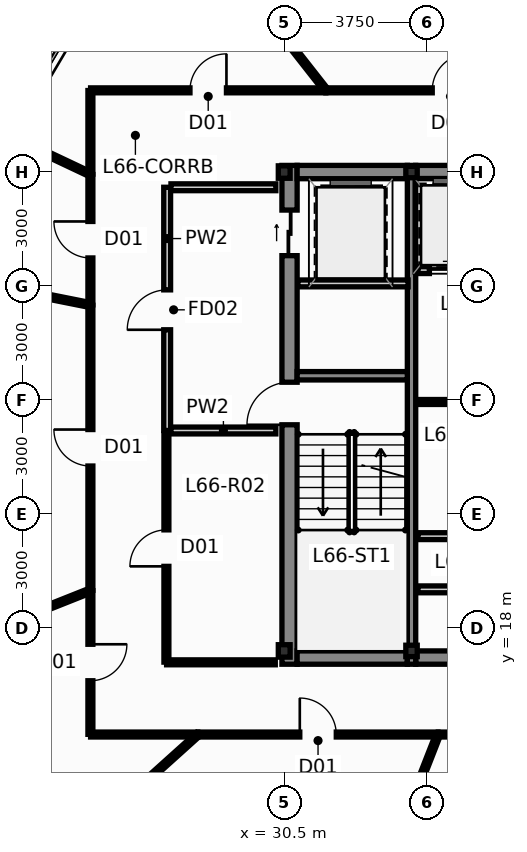
"""IFC4 building model, lengths in metres.
Left out: names, types, materials, properties, quantities, classifications, styles, units other than length and angle.
Written with IfcOpenShell. Run it as: python <this file> out.ifc"""

import sys

from ifc_helpers import new_model, si_unit, direction, frame, frame_2d, origin, origin_2d, place, context, subcontext, project, spatial, rectangle, hollow_rectangle, i_section, extrude, source, transform, mapped, element, fill, save


model = new_model("IFC4")
c1 = context("Model", 3, precision=1e-05, world=origin(), true_north=direction((0.0, 1.0)))
c2 = subcontext(c1, "Body", "Model", "MODEL_VIEW")
j1 = project(units=[si_unit("LENGTHUNIT", "METRE"), si_unit("PLANEANGLEUNIT", "RADIAN")], contexts=[c1])
p1 = place(None, origin())
s1 = spatial("IfcSite", under=j1, at=p1, CompositionType="ELEMENT")
p2 = place(p1, origin())
s2 = spatial("IfcBuilding", under=s1, at=p2, CompositionType="ELEMENT")
p3 = place(p2, frame((0.0, 0.0, 251.75)))
s3 = spatial("IfcBuildingStorey", under=s2, at=p3, CompositionType="ELEMENT", Elevation=251.75)
m1 = source(origin(), c2, "Body", "SweptSolid", [
    extrude(i_section(OverallWidth=0.311, OverallDepth=0.327, WebThickness=0.016, FlangeThickness=0.025, at=origin_2d()), origin(), (0.0, 0.0, 1.0), 3.65),
])
for number, where, z_axis, x_axis in (
    (1, (30.5, 17.4, 0.0), (0.0, 0.0, 1.0), (1.0, 0.0, 0.0)),
    (2, (30.5, 30.0, 0.0), (0.0, 0.0, 1.0), (1.0, 0.0, 0.0)),
):
    element("IfcColumn", number, at=place(p3, frame(where, z_axis=z_axis, x_axis=x_axis)), inside=s3, PredefinedType="COLUMN", context=c2, shape_type="MappedRepresentation", body=[
        mapped(m1, transform((0.0, 0.0, 0.0), scale=1.0)),
    ])
m2 = source(origin(), c2, "Body", "SweptSolid", [
    extrude(hollow_rectangle(XDim=0.3, YDim=0.3, WallThickness=0.012, at=origin_2d()), origin(), (0.0, 0.0, 1.0), 3.65),
])
for number, where, z_axis, x_axis in (
    (3, (33.85, 17.4, 0.0), (0.0, 0.0, 1.0), (1.0, 0.0, 0.0)),
    (4, (33.85, 30.0, 0.0), (0.0, 0.0, 1.0), (1.0, 0.0, 0.0)),
):
    element("IfcColumn", number, at=place(p3, frame(where, z_axis=z_axis, x_axis=x_axis)), inside=s3, PredefinedType="COLUMN", context=c2, shape_type="MappedRepresentation", body=[
        mapped(m2, transform((0.0, 0.0, 0.0), scale=1.0)),
    ])
p4 = place(p3, frame((30.64, 17.05, 0.0), z_axis=(0.0, 0.0, 1.0), x_axis=(0.0, 1.0, 0.0)))
e5 = element("IfcWall", 5, at=p4, inside=s3, PredefinedType="SHEAR", context=c2, shape_type="SweptSolid", body=[
    extrude(rectangle(XDim=13.125, YDim=0.4, at=frame_2d((6.562, 0.0))), origin(), (0.0, 0.0, 1.0), 3.65),
])
p5 = place(p4, frame((6.3, 0.0, 0.0)))
e6 = element("IfcOpeningElement", 6, at=p5, cuts=e5, PredefinedType="OPENING", context=c2, shape_type="SweptSolid", body=[
    extrude(rectangle(XDim=1.12, YDim=2.15, at=frame_2d((0.56, 1.075))), frame((0.0, 0.212, 0.0), z_axis=(0.0, -1.0, 0.0), x_axis=(1.0, 0.0, 0.0)), (0.0, 0.0, 1.0), 0.424),
])
p6 = place(p4, frame((10.75, 0.0, 0.0)))
e7 = element("IfcOpeningElement", 7, at=p6, cuts=e5, PredefinedType="OPENING", context=c2, shape_type="SweptSolid", body=[
    extrude(rectangle(XDim=1.2, YDim=2.2, at=frame_2d((0.6, 1.1))), frame((0.0, 0.212, 0.0), z_axis=(0.0, -1.0, 0.0), x_axis=(1.0, 0.0, 0.0)), (0.0, 0.0, 1.0), 0.424),
])
p7 = place(p3, frame((30.84, 17.225, 0.0), z_axis=(0.0, 0.0, 1.0), x_axis=(1.0, 0.0, 0.0)))
e8 = element("IfcWall", 8, at=p7, inside=s3, PredefinedType="SHEAR", context=c2, shape_type="SweptSolid", body=[
    extrude(rectangle(XDim=2.9, YDim=0.35, at=frame_2d((1.45, 0.0))), origin(), (0.0, 0.0, 1.0), 3.65),
])
p8 = place(p3, frame((33.96, 17.225, 0.0), z_axis=(0.0, 0.0, 1.0), x_axis=(1.0, 0.0, 0.0)))
e9 = element("IfcWall", 9, at=p8, inside=s3, PredefinedType="SHEAR", context=c2, shape_type="SweptSolid", body=[
    extrude(rectangle(XDim=8.08, YDim=0.35, at=frame_2d((4.04, 0.0))), origin(), (0.0, 0.0, 1.0), 3.65),
])
p9 = place(p3, frame((30.84, 30.0, 0.0), z_axis=(0.0, 0.0, 1.0), x_axis=(1.0, 0.0, 0.0)))
e10 = element("IfcWall", 10, at=p9, inside=s3, PredefinedType="SHEAR", context=c2, shape_type="SweptSolid", body=[
    extrude(rectangle(XDim=2.9, YDim=0.35, at=frame_2d((1.45, 0.0))), origin(), (0.0, 0.0, 1.0), 3.65),
])
p10 = place(p3, frame((33.96, 30.0, 0.0), z_axis=(0.0, 0.0, 1.0), x_axis=(1.0, 0.0, 0.0)))
e11 = element("IfcWall", 11, at=p10, inside=s3, PredefinedType="SHEAR", context=c2, shape_type="SweptSolid", body=[
    extrude(rectangle(XDim=3.78, YDim=0.35, at=frame_2d((1.89, 0.0))), origin(), (0.0, 0.0, 1.0), 3.65),
])
p11 = place(p3, frame((33.85, 17.05, 0.0), z_axis=(0.0, 0.0, 1.0), x_axis=(0.0, 1.0, 0.0)))
e12 = element("IfcWall", 12, at=p11, inside=s3, PredefinedType="SHEAR", context=c2, shape_type="SweptSolid", body=[
    extrude(rectangle(XDim=13.125, YDim=0.22, at=frame_2d((6.562, 0.0))), origin(), (0.0, 0.0, 1.0), 3.65),
])
p12 = place(p3, frame((30.84, 24.64, 0.0), z_axis=(0.0, 0.0, 1.0), x_axis=(1.0, 0.0, 0.0)))
e13 = element("IfcWall", 13, at=p12, inside=s3, PredefinedType="SHEAR", context=c2, shape_type="SweptSolid", body=[
    extrude(rectangle(XDim=2.9, YDim=0.22, at=frame_2d((1.45, 0.0))), origin(), (0.0, 0.0, 1.0), 3.65),
])
p13 = place(p3, frame((34.02, 27.42, 0.0), z_axis=(0.0, 0.0, 1.0), x_axis=(1.0, 0.0, 0.0)))
e14 = element("IfcWall", 14, at=p13, inside=s3, PredefinedType="PARTITIONING", context=c2, shape_type="SweptSolid", body=[
    extrude(rectangle(XDim=3.66, YDim=0.18, at=frame_2d((1.83, 0.0))), origin(), (0.0, 0.0, 1.0), 3.4),
])
p14 = place(p13, frame((0.3, 0.0, 0.0)))
e15 = element("IfcOpeningElement", 15, at=p14, cuts=e14, PredefinedType="OPENING", context=c2, shape_type="SweptSolid", body=[
    extrude(rectangle(XDim=1.15, YDim=2.2, at=frame_2d((0.575, 1.1))), frame((0.0, 0.102, 0.0), z_axis=(0.0, -1.0, 0.0), x_axis=(1.0, 0.0, 0.0)), (0.0, 0.0, 1.0), 0.204),
])
p15 = place(p13, frame((2.1, 0.0, 0.0)))
e16 = element("IfcOpeningElement", 16, at=p15, cuts=e14, PredefinedType="OPENING", context=c2, shape_type="SweptSolid", body=[
    extrude(rectangle(XDim=1.15, YDim=2.2, at=frame_2d((0.575, 1.1))), frame((0.0, 0.102, 0.0), z_axis=(0.0, -1.0, 0.0), x_axis=(1.0, 0.0, 0.0)), (0.0, 0.0, 1.0), 0.204),
])
p16 = place(p3, frame((27.42, 23.2, 0.0), z_axis=(0.0, 0.0, 1.0), x_axis=(0.0, 1.0, 0.0)))
e17 = element("IfcWall", 17, at=p16, inside=s3, PredefinedType="PARTITIONING", context=c2, shape_type="SweptSolid", body=[
    extrude(rectangle(XDim=6.4, YDim=0.18, at=frame_2d((3.2, 0.0))), origin(), (0.0, 0.0, 1.0), 3.129),
])
p17 = place(p16, frame((2.65, 0.0, 0.0)))
e18 = element("IfcOpeningElement", 18, at=p17, cuts=e17, PredefinedType="OPENING", context=c2, shape_type="SweptSolid", body=[
    extrude(rectangle(XDim=1.05, YDim=2.15, at=frame_2d((0.525, 1.075))), frame((0.0, 0.102, 0.0), z_axis=(0.0, -1.0, 0.0), x_axis=(1.0, 0.0, 0.0)), (0.0, 0.0, 1.0), 0.204),
])
for number, where, z_axis, x_axis in (
    (19, (27.52, 23.2, 0.0), (0.0, 0.0, 1.0), (1.0, 0.0, 0.0)),
    (20, (27.52, 29.6, 0.0), (0.0, 0.0, 1.0), (1.0, 0.0, 0.0)),
):
    element("IfcWall", number, at=place(p3, frame(where, z_axis=z_axis, x_axis=x_axis)), inside=s3, PredefinedType="PARTITIONING", context=c2, shape_type="SweptSolid", body=[
        extrude(rectangle(XDim=2.76, YDim=0.18, at=frame_2d((1.38, 0.0))), origin(), (0.0, 0.0, 1.0), 3.4),
    ])
p18 = place(p3, frame((30.86, 27.07, 0.0), z_axis=(0.0, 0.0, 1.0), x_axis=(1.0, 0.0, 0.0)))
e21 = element("IfcWall", 21, at=p18, inside=s3, PredefinedType="PARTITIONING", context=c2, shape_type="SweptSolid", body=[
    extrude(rectangle(XDim=2.9, YDim=0.18, at=frame_2d((1.45, 0.0))), origin(), (0.0, 0.0, 1.0), 3.4),
])
p19 = place(p3, frame((34.02, 20.42, 0.0), z_axis=(0.0, 0.0, 1.0), x_axis=(1.0, 0.0, 0.0)))
e22 = element("IfcWall", 22, at=p19, inside=s3, PredefinedType="PARTITIONING", context=c2, shape_type="SweptSolid", body=[
    extrude(rectangle(XDim=3.64, YDim=0.18, at=frame_2d((1.82, 0.0))), origin(), (0.0, 0.0, 1.0), 3.4),
])
p20 = place(p3, frame((34.02, 23.95, 0.0), z_axis=(0.0, 0.0, 1.0), x_axis=(1.0, 0.0, 0.0)))
e23 = element("IfcWall", 23, at=p20, inside=s3, PredefinedType="PARTITIONING", context=c2, shape_type="SweptSolid", body=[
    extrude(rectangle(XDim=3.58, YDim=0.13, at=frame_2d((1.79, 0.0))), origin(), (0.0, 0.0, 1.0), 3.4),
])
p21 = place(p3, frame((34.02, 19.02, 0.0), z_axis=(0.0, 0.0, 1.0), x_axis=(1.0, 0.0, 0.0)))
e24 = element("IfcWall", 24, at=p21, inside=s3, PredefinedType="PARTITIONING", context=c2, shape_type="SweptSolid", body=[
    extrude(rectangle(XDim=3.58, YDim=0.18, at=frame_2d((1.79, 0.0))), origin(), (0.0, 0.0, 1.0), 3.4),
])
p22 = place(p3, frame((13.459, 14.239, 0.0), z_axis=(0.0, 0.0, 1.0), x_axis=(0.929165812846, 0.369663214613, 0.0)))
e25 = element("IfcWall", 25, at=p22, inside=s3, PredefinedType="PARTITIONING", context=c2, shape_type="SweptSolid", body=[
    extrude(rectangle(XDim=12.846, YDim=0.13, at=frame_2d((6.423, 0.0))), origin(), (0.0, 0.0, 1.0), 2.985),
])
p23 = place(p3, frame((25.4, 18.995, 0.0), z_axis=(0.0, 0.0, 1.0), x_axis=(0.0, 1.0, 0.0)))
e26 = element("IfcWall", 26, at=p23, inside=s3, PredefinedType="PARTITIONING", context=c2, shape_type="SweptSolid", body=[
    extrude(rectangle(XDim=7.5, YDim=0.13, at=frame_2d((3.75, 0.0))), origin(), (0.0, 0.0, 1.0), 3.129),
])
p24 = place(p23, frame((3.27, 0.0, 0.0)))
e27 = element("IfcOpeningElement", 27, at=p24, cuts=e26, PredefinedType="OPENING", context=c2, shape_type="SweptSolid", body=[
    extrude(rectangle(XDim=0.96, YDim=2.15, at=frame_2d((0.48, 1.075))), frame((0.0, 0.077, 0.0), z_axis=(0.0, -1.0, 0.0), x_axis=(1.0, 0.0, 0.0)), (0.0, 0.0, 1.0), 0.154),
])
p25 = place(p3, frame((27.281, 37.652, 0.0), z_axis=(0.0, 0.0, 1.0), x_axis=(0.617460484655, -0.786601900512, 0.0)))
e28 = element("IfcWall", 28, at=p25, inside=s3, PredefinedType="PARTITIONING", context=c2, shape_type="SweptSolid", body=[
    extrude(rectangle(XDim=6.989, YDim=0.13, at=frame_2d((3.495, 0.0))), origin(), (0.0, 0.0, 1.0), 2.985),
])
p26 = place(p3, frame((31.605, 32.15, 0.0), z_axis=(0.0, 0.0, 1.0), x_axis=(1.0, 0.0, 0.0)))
e29 = element("IfcWall", 29, at=p26, inside=s3, PredefinedType="PARTITIONING", context=c2, shape_type="SweptSolid", body=[
    extrude(rectangle(XDim=6.54, YDim=0.13, at=frame_2d((3.27, 0.0))), origin(), (0.0, 0.0, 1.0), 3.4),
])
p27 = place(p26, frame((2.79, 0.0, 0.0)))
e30 = element("IfcOpeningElement", 30, at=p27, cuts=e29, PredefinedType="OPENING", context=c2, shape_type="SweptSolid", body=[
    extrude(rectangle(XDim=0.96, YDim=2.15, at=frame_2d((0.48, 1.075))), frame((0.0, 0.077, 0.0), z_axis=(0.0, -1.0, 0.0), x_axis=(1.0, 0.0, 0.0)), (0.0, 0.0, 1.0), 0.154),
])
p28 = place(p3, frame((28.235, 15.2, 0.0), z_axis=(0.0, 0.0, 1.0), x_axis=(1.0, 0.0, 0.0)))
e31 = element("IfcWall", 31, at=p28, inside=s3, PredefinedType="PARTITIONING", context=c2, shape_type="SweptSolid", body=[
    extrude(rectangle(XDim=6.31, YDim=0.13, at=frame_2d((3.155, 0.0))), origin(), (0.0, 0.0, 1.0), 3.129),
])
p29 = place(p28, frame((2.675, 0.0, 0.0)))
e32 = element("IfcOpeningElement", 32, at=p29, cuts=e31, PredefinedType="OPENING", context=c2, shape_type="SweptSolid", body=[
    extrude(rectangle(XDim=0.96, YDim=2.15, at=frame_2d((0.48, 1.075))), frame((0.0, 0.077, 0.0), z_axis=(0.0, -1.0, 0.0), x_axis=(1.0, 0.0, 0.0)), (0.0, 0.0, 1.0), 0.154),
])
p30 = place(p3, frame((25.405, 32.15, 0.0), z_axis=(0.0, 0.0, 1.0), x_axis=(1.0, 0.0, 0.0)))
e33 = element("IfcWall", 33, at=p30, inside=s3, PredefinedType="PARTITIONING", context=c2, shape_type="SweptSolid", body=[
    extrude(rectangle(XDim=6.19, YDim=0.13, at=frame_2d((3.095, 0.0))), origin(), (0.0, 0.0, 1.0), 3.4),
])
p31 = place(p30, frame((2.615, 0.0, 0.0)))
e34 = element("IfcOpeningElement", 34, at=p31, cuts=e33, PredefinedType="OPENING", context=c2, shape_type="SweptSolid", body=[
    extrude(rectangle(XDim=0.96, YDim=2.15, at=frame_2d((0.48, 1.075))), frame((0.0, 0.077, 0.0), z_axis=(0.0, -1.0, 0.0), x_axis=(1.0, 0.0, 0.0)), (0.0, 0.0, 1.0), 0.154),
])
p32 = place(p3, frame((27.4, 17.105, 0.0), z_axis=(0.0, 0.0, 1.0), x_axis=(0.0, 1.0, 0.0)))
e35 = element("IfcWall", 35, at=p32, inside=s3, PredefinedType="PARTITIONING", context=c2, shape_type="SweptSolid", body=[
    extrude(rectangle(XDim=6.0, YDim=0.13, at=frame_2d((3.0, 0.0))), origin(), (0.0, 0.0, 1.0), 3.4),
])
p33 = place(p32, frame((2.52, 0.0, 0.0)))
e36 = element("IfcOpeningElement", 36, at=p33, cuts=e35, PredefinedType="OPENING", context=c2, shape_type="SweptSolid", body=[
    extrude(rectangle(XDim=0.96, YDim=2.15, at=frame_2d((0.48, 1.075))), frame((0.0, 0.077, 0.0), z_axis=(0.0, -1.0, 0.0), x_axis=(1.0, 0.0, 0.0)), (0.0, 0.0, 1.0), 0.154),
])
p34 = place(p3, frame((21.193, 27.339, 0.0), z_axis=(0.0, 0.0, 1.0), x_axis=(0.98067042472, -0.195666854831, 0.0)))
e37 = element("IfcWall", 37, at=p34, inside=s3, PredefinedType="PARTITIONING", context=c2, shape_type="SweptSolid", body=[
    extrude(rectangle(XDim=4.285, YDim=0.13, at=frame_2d((2.142, 0.0))), origin(), (0.0, 0.0, 1.0), 3.4),
])
p35 = place(p3, frame((25.254, 12.523, 0.0), z_axis=(0.0, 0.0, 1.0), x_axis=(0.743403445774, 0.668843267748, 0.0)))
e38 = element("IfcWall", 38, at=p35, inside=s3, PredefinedType="PARTITIONING", context=c2, shape_type="SweptSolid", body=[
    extrude(rectangle(XDim=3.998, YDim=0.13, at=frame_2d((1.999, 0.0))), origin(), (0.0, 0.0, 1.0), 2.985),
])
p36 = place(p3, frame((25.4, 18.985, 0.0), z_axis=(0.0, 0.0, 1.0), x_axis=(0.0, -1.0, 0.0)))
e39 = element("IfcWall", 39, at=p36, inside=s3, PredefinedType="PARTITIONING", context=c2, shape_type="SweptSolid", body=[
    extrude(rectangle(XDim=3.78, YDim=0.13, at=frame_2d((1.89, 0.0))), origin(), (0.0, 0.0, 1.0), 3.129),
])
p37 = place(p36, frame((1.41, 0.0, 0.0)))
e40 = element("IfcOpeningElement", 40, at=p37, cuts=e39, PredefinedType="OPENING", context=c2, shape_type="SweptSolid", body=[
    extrude(rectangle(XDim=0.96, YDim=2.15, at=frame_2d((0.48, 1.075))), frame((0.0, 0.077, 0.0), z_axis=(0.0, -1.0, 0.0), x_axis=(1.0, 0.0, 0.0)), (0.0, 0.0, 1.0), 0.154),
])
p38 = place(p3, frame((25.4, 26.505, 0.0), z_axis=(0.0, 0.0, 1.0), x_axis=(0.0, 1.0, 0.0)))
e41 = element("IfcWall", 41, at=p38, inside=s3, PredefinedType="PARTITIONING", context=c2, shape_type="SweptSolid", body=[
    extrude(rectangle(XDim=3.43, YDim=0.13, at=frame_2d((1.715, 0.0))), origin(), (0.0, 0.0, 1.0), 3.129),
])
p39 = place(p38, frame((1.235, 0.0, 0.0)))
e42 = element("IfcOpeningElement", 42, at=p39, cuts=e41, PredefinedType="OPENING", context=c2, shape_type="SweptSolid", body=[
    extrude(rectangle(XDim=0.96, YDim=2.15, at=frame_2d((0.48, 1.075))), frame((0.0, 0.077, 0.0), z_axis=(0.0, -1.0, 0.0), x_axis=(1.0, 0.0, 0.0)), (0.0, 0.0, 1.0), 0.154),
])
p40 = place(p3, frame((30.265, 17.1, 0.0), z_axis=(0.0, 0.0, 1.0), x_axis=(-1.0, 0.0, 0.0)))
e43 = element("IfcWall", 43, at=p40, inside=s3, PredefinedType="PARTITIONING", context=c2, shape_type="SweptSolid", body=[
    extrude(rectangle(XDim=2.86, YDim=0.13, at=frame_2d((1.43, 0.0))), origin(), (0.0, 0.0, 1.0), 2.985),
])
p41 = place(p3, frame((33.502, 12.525, 0.0), z_axis=(0.0, 0.0, 1.0), x_axis=(0.364790923887, 0.931089459638, 0.0)))
e44 = element("IfcWall", 44, at=p41, inside=s3, PredefinedType="PARTITIONING", context=c2, shape_type="SweptSolid", body=[
    extrude(rectangle(XDim=2.868, YDim=0.13, at=frame_2d((1.434, 0.0))), origin(), (0.0, 0.0, 1.0), 3.4),
])
p42 = place(p3, frame((25.405, 15.2, 0.0), z_axis=(0.0, 0.0, 1.0), x_axis=(1.0, 0.0, 0.0)))
e45 = element("IfcWall", 45, at=p42, inside=s3, PredefinedType="PARTITIONING", context=c2, shape_type="SweptSolid", body=[
    extrude(rectangle(XDim=2.82, YDim=0.13, at=frame_2d((1.41, 0.0))), origin(), (0.0, 0.0, 1.0), 3.129),
])
p43 = place(p3, frame((23.311, 30.927, 0.0), z_axis=(0.0, 0.0, 1.0), x_axis=(0.90410203084, -0.427316648203, 0.0)))
e46 = element("IfcWall", 46, at=p43, inside=s3, PredefinedType="PARTITIONING", context=c2, shape_type="SweptSolid", body=[
    extrude(rectangle(XDim=2.305, YDim=0.13, at=frame_2d((1.152, 0.0))), origin(), (0.0, 0.0, 1.0), 3.4),
])
p44 = place(p3, frame((34.555, 15.2, 0.0), z_axis=(0.0, 0.0, 1.0), x_axis=(1.0, 0.0, 0.0)))
e47 = element("IfcWall", 47, at=p44, inside=s3, PredefinedType="PARTITIONING", context=c2, shape_type="SweptSolid", body=[
    extrude(rectangle(XDim=2.3, YDim=0.13, at=frame_2d((1.15, 0.0))), origin(), (0.0, 0.0, 1.0), 3.129),
])
p45 = place(p44, frame((0.67, 0.0, 0.0)))
e48 = element("IfcOpeningElement", 48, at=p45, cuts=e47, PredefinedType="OPENING", context=c2, shape_type="SweptSolid", body=[
    extrude(rectangle(XDim=0.96, YDim=2.15, at=frame_2d((0.48, 1.075))), frame((0.0, 0.077, 0.0), z_axis=(0.0, -1.0, 0.0), x_axis=(1.0, 0.0, 0.0)), (0.0, 0.0, 1.0), 0.154),
])
p46 = place(p3, frame((25.4, 29.945, 0.0), z_axis=(0.0, 0.0, 1.0), x_axis=(0.0, 1.0, 0.0)))
e49 = element("IfcWall", 49, at=p46, inside=s3, PredefinedType="PARTITIONING", context=c2, shape_type="SweptSolid", body=[
    extrude(rectangle(XDim=2.2, YDim=0.13, at=frame_2d((1.1, 0.0))), origin(), (0.0, 0.0, 1.0), 3.4),
])
p47 = place(p5, origin())
e50 = element("IfcDoor", 50, at=p47, inside=s3, OperationType="SINGLE_SWING_LEFT", PredefinedType="DOOR", context=c2, shape_type="SweptSolid", body=[
    extrude(rectangle(XDim=1.12, YDim=2.15, at=frame_2d((0.56, 1.075))), frame((0.0, 0.025, 0.0), z_axis=(0.0, -1.0, 0.0), x_axis=(1.0, 0.0, 0.0)), (0.0, 0.0, 1.0), 0.05),
])
fill(e6, e50)
p48 = place(p6, origin())
e51 = element("IfcDoor", 51, at=p48, inside=s3, OperationType="SLIDING_TO_LEFT", PredefinedType="DOOR", context=c2, shape_type="SweptSolid", body=[
    extrude(rectangle(XDim=1.2, YDim=2.2, at=frame_2d((0.6, 1.1))), frame((0.0, 0.025, 0.0), z_axis=(0.0, -1.0, 0.0), x_axis=(1.0, 0.0, 0.0)), (0.0, 0.0, 1.0), 0.05),
])
fill(e7, e51)
p49 = place(p14, origin())
e52 = element("IfcDoor", 52, at=p49, inside=s3, OperationType="SLIDING_TO_RIGHT", PredefinedType="DOOR", context=c2, shape_type="SweptSolid", body=[
    extrude(rectangle(XDim=1.15, YDim=2.2, at=frame_2d((0.575, 1.1))), frame((0.0, 0.025, 0.0), z_axis=(0.0, -1.0, 0.0), x_axis=(1.0, 0.0, 0.0)), (0.0, 0.0, 1.0), 0.05),
])
fill(e15, e52)
p50 = place(p17, origin())
e53 = element("IfcDoor", 53, at=p50, inside=s3, OperationType="SINGLE_SWING_LEFT", PredefinedType="DOOR", context=c2, shape_type="SweptSolid", body=[
    extrude(rectangle(XDim=1.05, YDim=2.15, at=frame_2d((0.525, 1.075))), frame((0.0, 0.025, 0.0), z_axis=(0.0, -1.0, 0.0), x_axis=(1.0, 0.0, 0.0)), (0.0, 0.0, 1.0), 0.05),
])
fill(e18, e53)
p51 = place(p24, origin())
e54 = element("IfcDoor", 54, at=p51, inside=s3, OperationType="SINGLE_SWING_RIGHT", PredefinedType="DOOR", context=c2, shape_type="SweptSolid", body=[
    extrude(rectangle(XDim=0.96, YDim=2.15, at=frame_2d((0.48, 1.075))), frame((0.0, 0.025, 0.0), z_axis=(0.0, -1.0, 0.0), x_axis=(1.0, 0.0, 0.0)), (0.0, 0.0, 1.0), 0.05),
])
fill(e27, e54)
p52 = place(p27, origin())
e55 = element("IfcDoor", 55, at=p52, inside=s3, OperationType="SINGLE_SWING_RIGHT", PredefinedType="DOOR", context=c2, shape_type="SweptSolid", body=[
    extrude(rectangle(XDim=0.96, YDim=2.15, at=frame_2d((0.48, 1.075))), frame((0.0, 0.025, 0.0), z_axis=(0.0, -1.0, 0.0), x_axis=(1.0, 0.0, 0.0)), (0.0, 0.0, 1.0), 0.05),
])
fill(e30, e55)
p53 = place(p29, origin())
e56 = element("IfcDoor", 56, at=p53, inside=s3, OperationType="SINGLE_SWING_LEFT", PredefinedType="DOOR", context=c2, shape_type="SweptSolid", body=[
    extrude(rectangle(XDim=0.96, YDim=2.15, at=frame_2d((0.48, 1.075))), frame((0.0, 0.025, 0.0), z_axis=(0.0, -1.0, 0.0), x_axis=(1.0, 0.0, 0.0)), (0.0, 0.0, 1.0), 0.05),
])
fill(e32, e56)
p54 = place(p31, origin())
e57 = element("IfcDoor", 57, at=p54, inside=s3, OperationType="SINGLE_SWING_RIGHT", PredefinedType="DOOR", context=c2, shape_type="SweptSolid", body=[
    extrude(rectangle(XDim=0.96, YDim=2.15, at=frame_2d((0.48, 1.075))), frame((0.0, 0.025, 0.0), z_axis=(0.0, -1.0, 0.0), x_axis=(1.0, 0.0, 0.0)), (0.0, 0.0, 1.0), 0.05),
])
fill(e34, e57)
p55 = place(p33, origin())
e58 = element("IfcDoor", 58, at=p55, inside=s3, OperationType="SINGLE_SWING_LEFT", PredefinedType="DOOR", context=c2, shape_type="SweptSolid", body=[
    extrude(rectangle(XDim=0.96, YDim=2.15, at=frame_2d((0.48, 1.075))), frame((0.0, 0.025, 0.0), z_axis=(0.0, -1.0, 0.0), x_axis=(1.0, 0.0, 0.0)), (0.0, 0.0, 1.0), 0.05),
])
fill(e36, e58)
p56 = place(p37, origin())
e59 = element("IfcDoor", 59, at=p56, inside=s3, OperationType="SINGLE_SWING_LEFT", PredefinedType="DOOR", context=c2, shape_type="SweptSolid", body=[
    extrude(rectangle(XDim=0.96, YDim=2.15, at=frame_2d((0.48, 1.075))), frame((0.0, 0.025, 0.0), z_axis=(0.0, -1.0, 0.0), x_axis=(1.0, 0.0, 0.0)), (0.0, 0.0, 1.0), 0.05),
])
fill(e40, e59)
p57 = place(p39, origin())
e60 = element("IfcDoor", 60, at=p57, inside=s3, OperationType="SINGLE_SWING_RIGHT", PredefinedType="DOOR", context=c2, shape_type="SweptSolid", body=[
    extrude(rectangle(XDim=0.96, YDim=2.15, at=frame_2d((0.48, 1.075))), frame((0.0, 0.025, 0.0), z_axis=(0.0, -1.0, 0.0), x_axis=(1.0, 0.0, 0.0)), (0.0, 0.0, 1.0), 0.05),
])
fill(e42, e60)
save(model, sys.argv[1])
